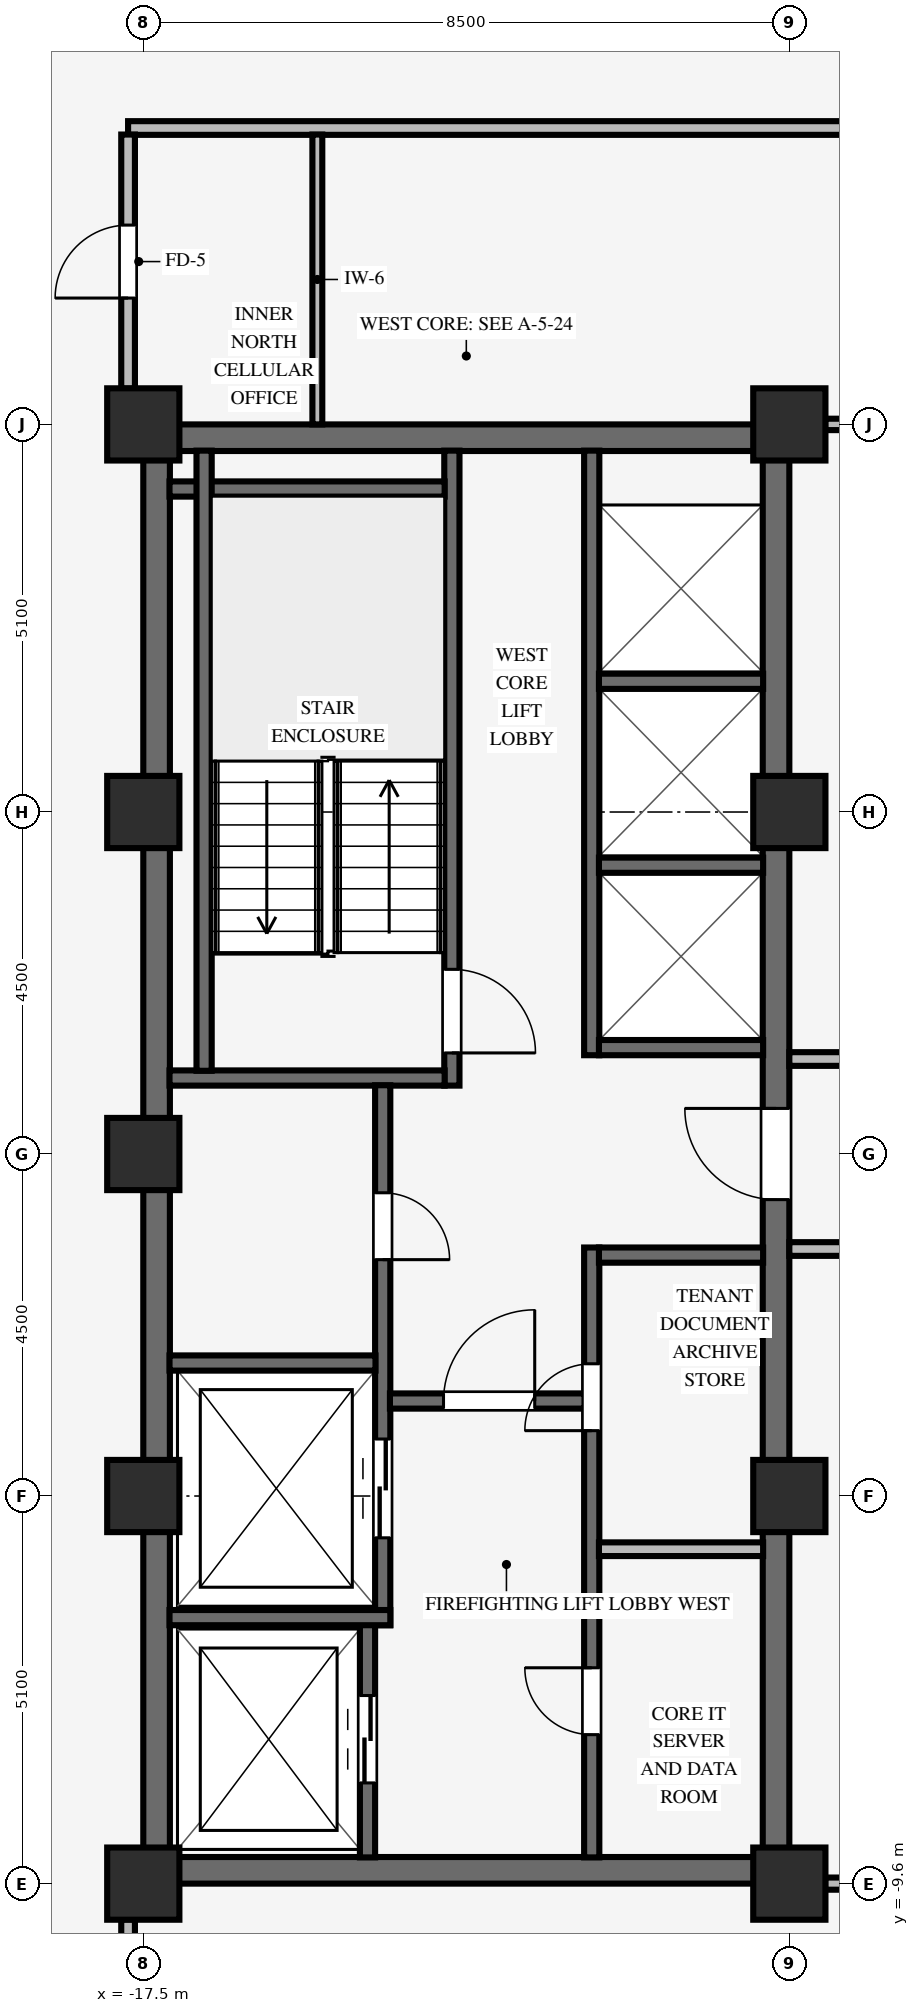
"""IFC4 building model, lengths in metres.
Left out: names, types, materials, properties, quantities, classifications, styles, units other than length and angle.
Written with IfcOpenShell. Run it as: python <this file> out.ifc"""

import sys

from ifc_helpers import new_model, si_unit, direction, frame, frame_2d, origin, origin_2d, place, context, subcontext, project, spatial, rectangle, extrude, source, transform, mapped, element, fill, save


model = new_model("IFC4")
c1 = context("Model", 3, precision=1e-05, world=origin(), true_north=direction((0.0, 1.0)))
c2 = subcontext(c1, "Body", "Model", "MODEL_VIEW")
j1 = project(units=[si_unit("LENGTHUNIT", "METRE"), si_unit("PLANEANGLEUNIT", "RADIAN")], contexts=[c1])
p1 = place(None, origin())
s1 = spatial("IfcSite", under=j1, at=p1, CompositionType="ELEMENT")
p2 = place(p1, origin())
s2 = spatial("IfcBuilding", under=s1, at=p2, CompositionType="ELEMENT")
p3 = place(p2, frame((0.0, 0.0, 209.15)))
s3 = spatial("IfcBuildingStorey", under=s2, at=p3, CompositionType="ELEMENT", Elevation=209.15)
for number, where, z_axis, x_axis in (
    (1, (-17.5, -9.425, 0.0), (0.0, 0.0, 1.0), (1.0, 0.0, 0.0)),
    (2, (-17.5, 9.425, 0.0), (0.0, 0.0, 1.0), (1.0, 0.0, 0.0)),
):
    element("IfcWall", number, at=place(p3, frame(where, z_axis=z_axis, x_axis=x_axis)), inside=s3, PredefinedType="SHEAR", context=c2, shape_type="SweptSolid", body=[
        extrude(rectangle(XDim=8.5, YDim=0.35, at=frame_2d((4.25, 0.0))), origin(), (0.0, 0.0, 1.0), 3.37),
    ])
p4 = place(p3, frame((-17.325, -9.255, 0.0), z_axis=(0.0, 0.0, 1.0), x_axis=(0.0, 1.0, 0.0)))
e3 = element("IfcWall", 3, at=p4, inside=s3, PredefinedType="SHEAR", context=c2, shape_type="SweptSolid", body=[
    extrude(rectangle(XDim=18.51, YDim=0.35, at=frame_2d((9.255, 0.0))), origin(), (0.0, 0.0, 1.0), 3.37),
])
p5 = place(p3, frame((-9.175, -9.255, 0.0), z_axis=(0.0, 0.0, 1.0), x_axis=(0.0, 1.0, 0.0)))
e4 = element("IfcWall", 4, at=p5, inside=s3, PredefinedType="SHEAR", context=c2, shape_type="SweptSolid", body=[
    extrude(rectangle(XDim=18.51, YDim=0.35, at=frame_2d((9.255, 0.0))), origin(), (0.0, 0.0, 1.0), 3.37),
])
p6 = place(p5, frame((8.655, 0.0, 0.0)))
e5 = element("IfcOpeningElement", 5, at=p6, cuts=e4, PredefinedType="OPENING", context=c2, shape_type="SweptSolid", body=[
    extrude(rectangle(XDim=1.2, YDim=2.15, at=frame_2d((0.6, 1.075))), frame((0.0, 0.185, 0.0), z_axis=(0.0, -1.0, 0.0), x_axis=(1.0, 0.0, 0.0)), (0.0, 0.0, 1.0), 0.37),
])
for number, where, z_axis, x_axis in (
    (6, (-17.5, -9.6, 0.0), (0.0, 0.0, 1.0), (1.0, 0.0, 0.0)),
    (7, (-17.5, -4.5, 0.0), (0.0, 0.0, 1.0), (1.0, 0.0, 0.0)),
    (8, (-17.5, 4.5, 0.0), (0.0, 0.0, 1.0), (1.0, 0.0, 0.0)),
    (9, (-17.5, 9.6, 0.0), (0.0, 0.0, 1.0), (1.0, 0.0, 0.0)),
    (10, (-9.0, -9.6, 0.0), (0.0, 0.0, 1.0), (1.0, 0.0, 0.0)),
    (11, (-9.0, -4.5, 0.0), (0.0, 0.0, 1.0), (1.0, 0.0, 0.0)),
    (12, (-9.0, 4.5, 0.0), (0.0, 0.0, 1.0), (1.0, 0.0, 0.0)),
    (13, (-9.0, 9.6, 0.0), (0.0, 0.0, 1.0), (1.0, 0.0, 0.0)),
    (14, (-17.5, 0.0, 0.0), (0.0, 0.0, 1.0), (1.0, 0.0, 0.0)),
):
    element("IfcColumn", number, at=place(p3, frame(where, z_axis=z_axis, x_axis=x_axis)), inside=s3, PredefinedType="COLUMN", context=c2, shape_type="SweptSolid", body=[
        extrude(rectangle(XDim=0.95, YDim=0.95, at=origin_2d()), origin(), (0.0, 0.0, 1.0), 3.37),
    ])
p7 = place(p3, frame((-13.44, 0.9, 0.0), z_axis=(0.0, 0.0, 1.0), x_axis=(0.0, 1.0, 0.0)))
e15 = element("IfcWall", 15, at=p7, inside=s3, PredefinedType="SHEAR", context=c2, shape_type="SweptSolid", body=[
    extrude(rectangle(XDim=8.355, YDim=0.2, at=frame_2d((4.177, 0.0))), origin(), (0.0, 0.0, 1.0), 3.37),
])
p8 = place(p7, frame((1.53, 0.0, 0.0), z_axis=(0.0, 0.0, 1.0), x_axis=(-1.0, 0.0, 0.0)))
e16 = element("IfcOpeningElement", 16, at=p8, cuts=e15, PredefinedType="OPENING", context=c2, shape_type="SweptSolid", body=[
    extrude(rectangle(XDim=1.1, YDim=2.15, at=frame_2d((0.55, 1.075))), frame((0.0, 0.11, 0.0), z_axis=(0.0, -1.0, 0.0), x_axis=(1.0, 0.0, 0.0)), (0.0, 0.0, 1.0), 0.22),
])
for number, where, z_axis, x_axis in (
    (17, (-17.155, 1.0, 0.0), (0.0, 0.0, 1.0), (1.0, 0.0, 0.0)),
    (18, (-17.155, 8.75, 0.0), (0.0, 0.0, 1.0), (1.0, 0.0, 0.0)),
):
    element("IfcWall", number, at=place(p3, frame(where, z_axis=z_axis, x_axis=x_axis)), inside=s3, PredefinedType="SHEAR", context=c2, shape_type="SweptSolid", body=[
        extrude(rectangle(XDim=3.62, YDim=0.2, at=frame_2d((1.81, 0.0))), origin(), (0.0, 0.0, 1.0), 3.37),
    ])
p9 = place(p3, frame((-16.7, 1.095, 0.0), z_axis=(0.0, 0.0, 1.0), x_axis=(0.0, 1.0, 0.0)))
e19 = element("IfcWall", 19, at=p9, inside=s3, PredefinedType="SHEAR", context=c2, shape_type="SweptSolid", body=[
    extrude(rectangle(XDim=8.16, YDim=0.2, at=frame_2d((4.08, 0.0))), origin(), (0.0, 0.0, 1.0), 3.37),
])
p10 = place(p3, frame((-14.55, -9.255, 0.0), z_axis=(0.0, 0.0, 1.0), x_axis=(0.0, 1.0, 0.0)))
e20 = element("IfcWall", 20, at=p10, inside=s3, PredefinedType="SHEAR", context=c2, shape_type="SweptSolid", body=[
    extrude(rectangle(XDim=3.06, YDim=0.2, at=frame_2d((1.53, 0.0))), origin(), (0.0, 0.0, 1.0), 3.37),
])
p11 = place(p10, frame((0.98, 0.0, 0.0)))
e21 = element("IfcOpeningElement", 21, at=p11, cuts=e20, PredefinedType="OPENING", context=c2, shape_type="SweptSolid", body=[
    extrude(rectangle(XDim=1.15, YDim=2.15, at=frame_2d((0.575, 1.075))), frame((0.0, 0.11, 0.0), z_axis=(0.0, -1.0, 0.0), x_axis=(1.0, 0.0, 0.0)), (0.0, 0.0, 1.0), 0.22),
])
p12 = place(p3, frame((-14.35, -6.2, 0.0), z_axis=(0.0, 0.0, 1.0), x_axis=(0.0, 1.0, 0.0)))
e22 = element("IfcWall", 22, at=p12, inside=s3, PredefinedType="SHEAR", context=c2, shape_type="SweptSolid", body=[
    extrude(rectangle(XDim=7.105, YDim=0.2, at=frame_2d((3.552, 0.0))), origin(), (0.0, 0.0, 1.0), 3.37),
])
p13 = place(p12, frame((5.69, 0.0, 0.0), z_axis=(0.0, 0.0, 1.0), x_axis=(-1.0, 0.0, 0.0)))
e23 = element("IfcOpeningElement", 23, at=p13, cuts=e22, PredefinedType="OPENING", context=c2, shape_type="SweptSolid", body=[
    extrude(rectangle(XDim=0.88, YDim=2.1, at=frame_2d((0.44, 1.05))), frame((0.0, 0.11, 0.0), z_axis=(0.0, -1.0, 0.0), x_axis=(1.0, 0.0, 0.0)), (0.0, 0.0, 1.0), 0.22),
])
p14 = place(p12, frame((1.15, 0.0, 0.0)))
e24 = element("IfcOpeningElement", 24, at=p14, cuts=e22, PredefinedType="OPENING", context=c2, shape_type="SweptSolid", body=[
    extrude(rectangle(XDim=1.3, YDim=2.2, at=frame_2d((0.65, 1.1))), frame((0.0, 0.11, 0.0), z_axis=(0.0, -1.0, 0.0), x_axis=(1.0, 0.0, 0.0)), (0.0, 0.0, 1.0), 0.22),
])
p15 = place(p3, frame((-17.155, -6.1, 0.0), z_axis=(0.0, 0.0, 1.0), x_axis=(1.0, 0.0, 0.0)))
e25 = element("IfcWall", 25, at=p15, inside=s3, PredefinedType="SHEAR", context=c2, shape_type="SweptSolid", body=[
    extrude(rectangle(XDim=2.905, YDim=0.2, at=frame_2d((1.453, 0.0))), origin(), (0.0, 0.0, 1.0), 3.37),
])
p16 = place(p3, frame((-17.155, -2.75, 0.0), z_axis=(0.0, 0.0, 1.0), x_axis=(1.0, 0.0, 0.0)))
e26 = element("IfcWall", 26, at=p16, inside=s3, PredefinedType="SHEAR", context=c2, shape_type="SweptSolid", body=[
    extrude(rectangle(XDim=2.71, YDim=0.2, at=frame_2d((1.355, 0.0))), origin(), (0.0, 0.0, 1.0), 3.37),
])
p17 = place(p3, frame((-11.6, -9.255, 0.0), z_axis=(0.0, 0.0, 1.0), x_axis=(0.0, 1.0, 0.0)))
e27 = element("IfcWall", 27, at=p17, inside=s3, PredefinedType="SHEAR", context=c2, shape_type="SweptSolid", body=[
    extrude(rectangle(XDim=8.025, YDim=0.2, at=frame_2d((4.012, 0.0))), origin(), (0.0, 0.0, 1.0), 3.37),
])
p18 = place(p17, frame((1.615, 0.0, 0.0)))
e28 = element("IfcOpeningElement", 28, at=p18, cuts=e27, PredefinedType="OPENING", context=c2, shape_type="SweptSolid", body=[
    extrude(rectangle(XDim=0.88, YDim=2.1, at=frame_2d((0.44, 1.05))), frame((0.0, 0.11, 0.0), z_axis=(0.0, -1.0, 0.0), x_axis=(1.0, 0.0, 0.0)), (0.0, 0.0, 1.0), 0.22),
])
p19 = place(p17, frame((5.615, 0.0, 0.0)))
e29 = element("IfcOpeningElement", 29, at=p19, cuts=e27, PredefinedType="OPENING", context=c2, shape_type="SweptSolid", body=[
    extrude(rectangle(XDim=0.88, YDim=2.1, at=frame_2d((0.44, 1.05))), frame((0.0, 0.11, 0.0), z_axis=(0.0, -1.0, 0.0), x_axis=(1.0, 0.0, 0.0)), (0.0, 0.0, 1.0), 0.22),
])
p20 = place(p3, frame((-14.255, -3.25, 0.0), z_axis=(0.0, 0.0, 1.0), x_axis=(1.0, 0.0, 0.0)))
e30 = element("IfcWall", 30, at=p20, inside=s3, PredefinedType="SHEAR", context=c2, shape_type="SweptSolid", body=[
    extrude(rectangle(XDim=2.56, YDim=0.2, at=frame_2d((1.28, 0.0))), origin(), (0.0, 0.0, 1.0), 3.37),
])
p21 = place(p20, frame((0.705, 0.0, 0.0)))
e31 = element("IfcOpeningElement", 31, at=p21, cuts=e30, PredefinedType="OPENING", context=c2, shape_type="SweptSolid", body=[
    extrude(rectangle(XDim=1.2, YDim=2.15, at=frame_2d((0.6, 1.075))), frame((0.0, 0.11, 0.0), z_axis=(0.0, -1.0, 0.0), x_axis=(1.0, 0.0, 0.0)), (0.0, 0.0, 1.0), 0.22),
])
p22 = place(p3, frame((-11.505, -1.33, 0.0), z_axis=(0.0, 0.0, 1.0), x_axis=(1.0, 0.0, 0.0)))
e32 = element("IfcWall", 32, at=p22, inside=s3, PredefinedType="SHEAR", context=c2, shape_type="SweptSolid", body=[
    extrude(rectangle(XDim=2.16, YDim=0.2, at=frame_2d((1.08, 0.0))), origin(), (0.0, 0.0, 1.0), 3.37),
])
p23 = place(p3, frame((-11.505, -5.2, 0.0), z_axis=(0.0, 0.0, 1.0), x_axis=(1.0, 0.0, 0.0)))
e33 = element("IfcWall", 33, at=p23, inside=s3, PredefinedType="PARTITIONING", context=c2, shape_type="SweptSolid", body=[
    extrude(rectangle(XDim=2.16, YDim=0.18, at=frame_2d((1.08, 0.0))), origin(), (0.0, 0.0, 1.0), 3.36),
])
p24 = place(p3, frame((-11.6, 1.3, 0.0), z_axis=(0.0, 0.0, 1.0), x_axis=(0.0, 1.0, 0.0)))
e34 = element("IfcWall", 34, at=p24, inside=s3, PredefinedType="SHEAR", context=c2, shape_type="SweptSolid", body=[
    extrude(rectangle(XDim=7.955, YDim=0.2, at=frame_2d((3.978, 0.0))), origin(), (0.0, 0.0, 1.0), 3.37),
])
for number, where, z_axis, x_axis in (
    (35, (-11.505, 1.4, 0.0), (0.0, 0.0, 1.0), (1.0, 0.0, 0.0)),
    (36, (-11.505, 3.8, 0.0), (0.0, 0.0, 1.0), (1.0, 0.0, 0.0)),
    (37, (-11.505, 6.22, 0.0), (0.0, 0.0, 1.0), (1.0, 0.0, 0.0)),
):
    element("IfcWall", number, at=place(p3, frame(where, z_axis=z_axis, x_axis=x_axis)), inside=s3, PredefinedType="SHEAR", context=c2, shape_type="SweptSolid", body=[
        extrude(rectangle(XDim=2.16, YDim=0.2, at=frame_2d((1.08, 0.0))), origin(), (0.0, 0.0, 1.0), 3.37),
    ])
p25 = place(p3, frame((-8.529, -9.6, 0.0), z_axis=(0.0, 0.0, 1.0), x_axis=(1.0, 0.0, 0.0)))
e38 = element("IfcWall", 38, at=p25, inside=s3, PredefinedType="PARTITIONING", context=c2, shape_type="SweptSolid", body=[
    extrude(rectangle(XDim=8.378, YDim=0.16, at=frame_2d((4.189, 0.0))), origin(), (0.0, 0.0, 1.0), 2.405),
])
p26 = place(p3, frame((-9.0, -1.25, 0.0), z_axis=(0.0, 0.0, 1.0), x_axis=(1.0, 0.0, 0.0)))
e39 = element("IfcWall", 39, at=p26, inside=s3, PredefinedType="PARTITIONING", context=c2, shape_type="SweptSolid", body=[
    extrude(rectangle(XDim=15.6, YDim=0.18, at=frame_2d((7.8, 0.0))), origin(), (0.0, 0.0, 1.0), 3.36),
])
p27 = place(p26, frame((7.32, 0.0, 0.0)))
e40 = element("IfcOpeningElement", 40, at=p27, cuts=e39, PredefinedType="OPENING", context=c2, shape_type="SweptSolid", body=[
    extrude(rectangle(XDim=0.96, YDim=2.1, at=frame_2d((0.48, 1.05))), frame((0.0, 0.1, 0.0), z_axis=(0.0, -1.0, 0.0), x_axis=(1.0, 0.0, 0.0)), (0.0, 0.0, 1.0), 0.2),
])
p28 = place(p3, frame((-9.0, 1.25, 0.0), z_axis=(0.0, 0.0, 1.0), x_axis=(1.0, 0.0, 0.0)))
e41 = element("IfcWall", 41, at=p28, inside=s3, PredefinedType="PARTITIONING", context=c2, shape_type="SweptSolid", body=[
    extrude(rectangle(XDim=15.6, YDim=0.18, at=frame_2d((7.8, 0.0))), origin(), (0.0, 0.0, 1.0), 3.36),
])
p29 = place(p28, frame((3.32, 0.0, 0.0)))
e42 = element("IfcOpeningElement", 42, at=p29, cuts=e41, PredefinedType="OPENING", context=c2, shape_type="SweptSolid", body=[
    extrude(rectangle(XDim=0.96, YDim=2.1, at=frame_2d((0.48, 1.05))), frame((0.0, 0.1, 0.0), z_axis=(0.0, -1.0, 0.0), x_axis=(1.0, 0.0, 0.0)), (0.0, 0.0, 1.0), 0.2),
])
p30 = place(p3, frame((-8.529, 9.6, 0.0), z_axis=(0.0, 0.0, 1.0), x_axis=(1.0, 0.0, 0.0)))
e43 = element("IfcWall", 43, at=p30, inside=s3, PredefinedType="PARTITIONING", context=c2, shape_type="SweptSolid", body=[
    extrude(rectangle(XDim=8.378, YDim=0.15, at=frame_2d((4.189, 0.0))), origin(), (0.0, 0.0, 1.0), 2.405),
])
p31 = place(p3, frame((-17.7, 13.5, 0.0), z_axis=(0.0, 0.0, 1.0), x_axis=(1.0, 0.0, 0.0)))
e44 = element("IfcWall", 44, at=p31, inside=s3, PredefinedType="PARTITIONING", context=c2, shape_type="SweptSolid", body=[
    extrude(rectangle(XDim=24.3, YDim=0.18, at=frame_2d((12.15, 0.0))), origin(), (0.0, 0.0, 1.0), 3.008),
])
p32 = place(p31, frame((9.915, 0.0, 0.0)))
e45 = element("IfcOpeningElement", 45, at=p32, cuts=e44, PredefinedType="OPENING", context=c2, shape_type="SweptSolid", body=[
    extrude(rectangle(XDim=0.96, YDim=2.1, at=frame_2d((0.48, 1.05))), frame((0.0, 0.1, 0.0), z_axis=(0.0, -1.0, 0.0), x_axis=(1.0, 0.0, 0.0)), (0.0, 0.0, 1.0), 0.2),
])
p33 = place(p31, frame((18.9, 0.0, 0.0)))
e46 = element("IfcOpeningElement", 46, at=p33, cuts=e44, PredefinedType="OPENING", context=c2, shape_type="SweptSolid", body=[
    extrude(rectangle(XDim=0.9, YDim=2.1, at=frame_2d((0.45, 1.05))), frame((0.0, 0.1, 0.0), z_axis=(0.0, -1.0, 0.0), x_axis=(1.0, 0.0, 0.0)), (0.0, 0.0, 1.0), 0.2),
])
p34 = place(p31, frame((21.0, 0.0, 0.0)))
e47 = element("IfcOpeningElement", 47, at=p34, cuts=e44, PredefinedType="OPENING", context=c2, shape_type="SweptSolid", body=[
    extrude(rectangle(XDim=0.9, YDim=2.1, at=frame_2d((0.45, 1.05))), frame((0.0, 0.1, 0.0), z_axis=(0.0, -1.0, 0.0), x_axis=(1.0, 0.0, 0.0)), (0.0, 0.0, 1.0), 0.2),
])
p35 = place(p3, frame((-17.7, -13.414, 0.0), z_axis=(0.0, 0.0, 1.0), x_axis=(0.0, 1.0, 0.0)))
e48 = element("IfcWall", 48, at=p35, inside=s3, PredefinedType="PARTITIONING", context=c2, shape_type="SweptSolid", body=[
    extrude(rectangle(XDim=3.343, YDim=0.18, at=frame_2d((1.671, 0.0))), origin(), (0.0, 0.0, 1.0), 2.816),
])
p36 = place(p3, frame((-17.7, 10.071, 0.0), z_axis=(0.0, 0.0, 1.0), x_axis=(0.0, 1.0, 0.0)))
e49 = element("IfcWall", 49, at=p36, inside=s3, PredefinedType="PARTITIONING", context=c2, shape_type="SweptSolid", body=[
    extrude(rectangle(XDim=3.343, YDim=0.18, at=frame_2d((1.671, 0.0))), origin(), (0.0, 0.0, 1.0), 2.816),
])
p37 = place(p36, frame((1.191, 0.0, 0.0)))
e50 = element("IfcOpeningElement", 50, at=p37, cuts=e49, PredefinedType="OPENING", context=c2, shape_type="SweptSolid", body=[
    extrude(rectangle(XDim=0.96, YDim=2.1, at=frame_2d((0.48, 1.05))), frame((0.0, 0.1, 0.0), z_axis=(0.0, -1.0, 0.0), x_axis=(1.0, 0.0, 0.0)), (0.0, 0.0, 1.0), 0.2),
])
p38 = place(p3, frame((-15.21, 9.6, 0.0), z_axis=(0.0, 0.0, 1.0), x_axis=(0.0, 1.0, 0.0)))
e51 = element("IfcWall", 51, at=p38, inside=s3, PredefinedType="PARTITIONING", context=c2, shape_type="SweptSolid", body=[
    extrude(rectangle(XDim=3.814, YDim=0.13, at=frame_2d((1.907, 0.0))), origin(), (0.0, 0.0, 1.0), 3.36),
])
m1 = source(origin(), c2, "Body", "SweptSolid", [
    extrude(rectangle(XDim=1.1, YDim=2.15, at=frame_2d((0.55, 1.075))), frame((0.0, 0.025, 0.0), z_axis=(0.0, -1.0, 0.0), x_axis=(1.0, 0.0, 0.0)), (0.0, 0.0, 1.0), 0.05),
])
p39 = place(p8, origin())
e52 = element("IfcDoor", 52, at=p39, inside=s3, OperationType="SINGLE_SWING_RIGHT", PredefinedType="DOOR", context=c2, shape_type="MappedRepresentation", body=[
    mapped(m1, transform((0.0, 0.0, 0.0), scale=1.0)),
])
fill(e16, e52)
m2 = source(origin(), c2, "Body", "SweptSolid", [
    extrude(rectangle(XDim=0.88, YDim=2.1, at=frame_2d((0.44, 1.05))), frame((0.0, 0.025, 0.0), z_axis=(0.0, -1.0, 0.0), x_axis=(1.0, 0.0, 0.0)), (0.0, 0.0, 1.0), 0.05),
])
p40 = place(p13, origin())
e53 = element("IfcDoor", 53, at=p40, inside=s3, OperationType="SINGLE_SWING_RIGHT", PredefinedType="DOOR", context=c2, shape_type="MappedRepresentation", body=[
    mapped(m2, transform((0.0, 0.0, 0.0), scale=1.0)),
])
fill(e23, e53)
m3 = source(origin(), c2, "Body", "SweptSolid", [
    extrude(rectangle(XDim=1.2, YDim=2.15, at=frame_2d((0.6, 1.075))), frame((0.0, 0.025, 0.0), z_axis=(0.0, -1.0, 0.0), x_axis=(1.0, 0.0, 0.0)), (0.0, 0.0, 1.0), 0.05),
])
p41 = place(p21, origin())
e54 = element("IfcDoor", 54, at=p41, inside=s3, OperationType="SINGLE_SWING_RIGHT", PredefinedType="DOOR", context=c2, shape_type="MappedRepresentation", body=[
    mapped(m3, transform((0.0, 0.0, 0.0), scale=1.0)),
])
fill(e31, e54)
p42 = place(p18, origin())
e55 = element("IfcDoor", 55, at=p42, inside=s3, OperationType="SINGLE_SWING_RIGHT", PredefinedType="DOOR", context=c2, shape_type="MappedRepresentation", body=[
    mapped(m2, transform((0.0, 0.0, 0.0), scale=1.0)),
])
fill(e28, e55)
p43 = place(p19, origin())
e56 = element("IfcDoor", 56, at=p43, inside=s3, OperationType="SINGLE_SWING_LEFT", PredefinedType="DOOR", context=c2, shape_type="MappedRepresentation", body=[
    mapped(m2, transform((0.0, 0.0, 0.0), scale=1.0)),
])
fill(e29, e56)
p44 = place(p6, origin())
e57 = element("IfcDoor", 57, at=p44, inside=s3, OperationType="SINGLE_SWING_RIGHT", PredefinedType="DOOR", context=c2, shape_type="MappedRepresentation", body=[
    mapped(m3, transform((0.0, 0.0, 0.0), scale=1.0)),
])
fill(e5, e57)
m4 = source(origin(), c2, "Body", "SweptSolid", [
    extrude(rectangle(XDim=1.15, YDim=2.15, at=frame_2d((0.575, 1.075))), frame((0.0, 0.025, 0.0), z_axis=(0.0, -1.0, 0.0), x_axis=(1.0, 0.0, 0.0)), (0.0, 0.0, 1.0), 0.05),
])
p45 = place(p11, origin())
e58 = element("IfcDoor", 58, at=p45, inside=s3, OperationType="DOUBLE_DOOR_SLIDING", PredefinedType="DOOR", context=c2, shape_type="MappedRepresentation", body=[
    mapped(m4, transform((0.0, 0.0, 0.0), scale=1.0)),
])
fill(e21, e58)
m5 = source(origin(), c2, "Body", "SweptSolid", [
    extrude(rectangle(XDim=1.3, YDim=2.2, at=frame_2d((0.65, 1.1))), frame((0.0, 0.025, 0.0), z_axis=(0.0, -1.0, 0.0), x_axis=(1.0, 0.0, 0.0)), (0.0, 0.0, 1.0), 0.05),
])
p46 = place(p14, origin())
e59 = element("IfcDoor", 59, at=p46, inside=s3, OperationType="DOUBLE_DOOR_SLIDING", PredefinedType="DOOR", context=c2, shape_type="MappedRepresentation", body=[
    mapped(m5, transform((0.0, 0.0, 0.0), scale=1.0)),
])
fill(e24, e59)
m6 = source(origin(), c2, "Body", "SweptSolid", [
    extrude(rectangle(XDim=0.96, YDim=2.1, at=frame_2d((0.48, 1.05))), frame((0.0, 0.025, 0.0), z_axis=(0.0, -1.0, 0.0), x_axis=(1.0, 0.0, 0.0)), (0.0, 0.0, 1.0), 0.05),
])
p47 = place(p37, origin())
e60 = element("IfcDoor", 60, at=p47, inside=s3, OperationType="SINGLE_SWING_LEFT", PredefinedType="DOOR", context=c2, shape_type="MappedRepresentation", body=[
    mapped(m6, transform((0.0, 0.0, 0.0), scale=1.0)),
])
fill(e50, e60)
save(model, sys.argv[1])
